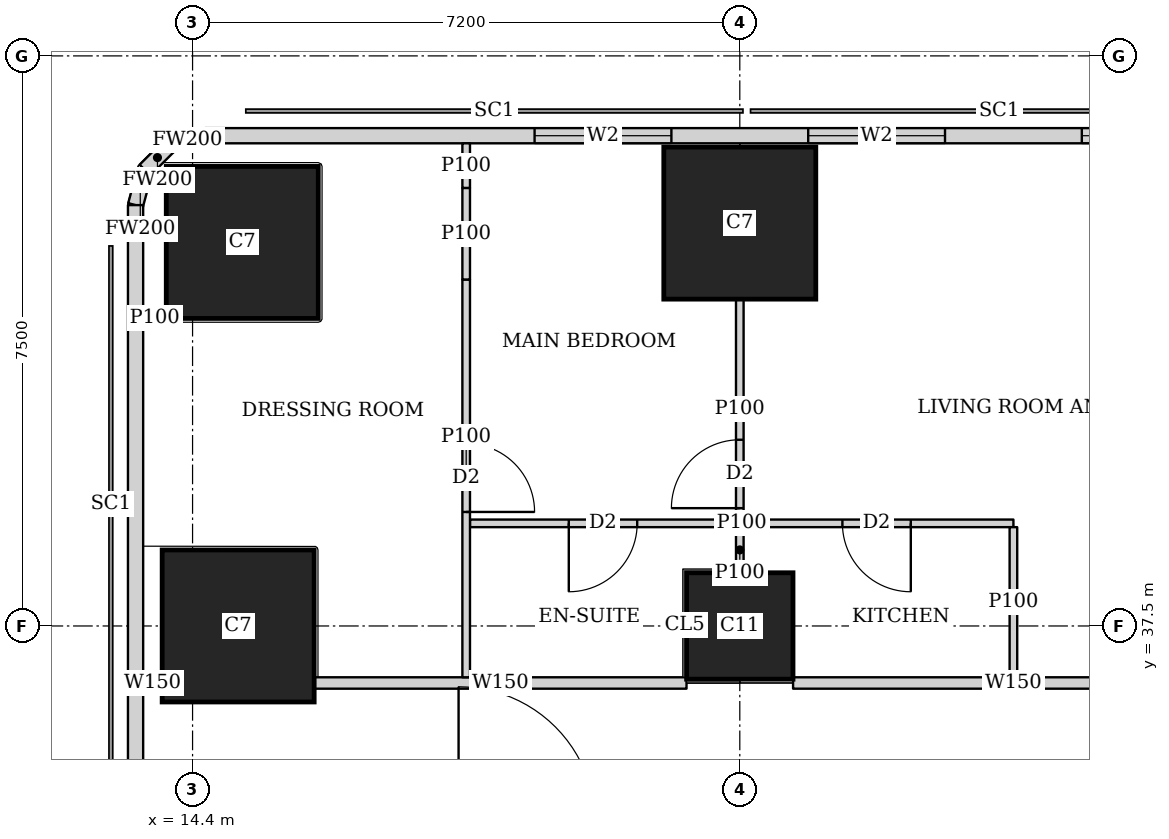
"""IFC4 building model, lengths in metres.
Left out: names, types, materials, properties, quantities, classifications, styles, units other than length and angle.
Written with IfcOpenShell. Run it as: python <this file> out.ifc"""

import sys

from ifc_helpers import new_model, si_unit, direction, frame, frame_2d, origin, origin_2d, place, context, subcontext, project, spatial, rectangle, extrude, element, fill, save


model = new_model("IFC4")
c1 = context("Model", 3, precision=1e-05, world=origin(), true_north=direction((0.0, 1.0)))
c2 = subcontext(c1, "Body", "Model", "MODEL_VIEW")
j1 = project(units=[si_unit("LENGTHUNIT", "METRE"), si_unit("PLANEANGLEUNIT", "RADIAN")], contexts=[c1])
p1 = place(None, origin())
s1 = spatial("IfcSite", under=j1, at=p1, CompositionType="ELEMENT")
p2 = place(p1, origin())
s2 = spatial("IfcBuilding", under=s1, at=p2, CompositionType="ELEMENT")
p3 = place(p2, frame((0.0, 0.0, 292.85)))
s3 = spatial("IfcBuildingStorey", under=s2, at=p3, CompositionType="ELEMENT", Elevation=292.85)
p4 = place(p3, frame((15.0, 37.5, 0.0), z_axis=(0.0, 0.0, 1.0), x_axis=(1.0, 0.0, 0.0)))
e1 = element("IfcColumn", 1, at=p4, inside=s3, PredefinedType="COLUMN", context=c2, shape_type="SweptSolid", body=[
    extrude(rectangle(XDim=2.0, YDim=2.0, at=origin_2d()), origin(), (0.0, 0.0, 1.0), 3.75),
])
p5 = place(p3, frame((21.6, 37.5, 0.0), z_axis=(0.0, 0.0, 1.0), x_axis=(1.0, 0.0, 0.0)))
e2 = element("IfcColumn", 2, at=p5, inside=s3, PredefinedType="COLUMN", context=c2, shape_type="SweptSolid", body=[
    extrude(rectangle(XDim=1.4, YDim=1.4, at=origin_2d()), origin(), (0.0, 0.0, 1.0), 3.75),
])
for number, where, z_axis, x_axis in (
    (3, (15.054, 42.546, 0.0), (0.0, 0.0, 1.0), (1.0, 0.0, 0.0)),
    (4, (21.6, 42.8, 0.0), (0.0, 0.0, 1.0), (1.0, 0.0, 0.0)),
):
    element("IfcColumn", number, at=place(p3, frame(where, z_axis=z_axis, x_axis=x_axis)), inside=s3, PredefinedType="COLUMN", context=c2, shape_type="SweptSolid", body=[
        extrude(rectangle(XDim=2.0, YDim=2.0, at=origin_2d()), origin(), (0.0, 0.0, 1.0), 3.75),
    ])
p6 = place(p3, frame((42.103, 43.95, 0.0), z_axis=(0.0, 0.0, 1.0), x_axis=(-1.0, 0.0, 0.0)))
e5 = element("IfcWall", 5, at=p6, inside=s3, PredefinedType="SOLIDWALL", context=c2, shape_type="SweptSolid", body=[
    extrude(rectangle(XDim=27.54, YDim=0.2, at=frame_2d((13.77, 0.0))), origin(), (0.0, 0.0, 1.0), 3.4),
])
p7 = place(p6, frame((10.603, 0.0, 0.9)))
e6 = element("IfcOpeningElement", 6, at=p7, cuts=e5, PredefinedType="OPENING", context=c2, shape_type="SweptSolid", body=[
    extrude(rectangle(XDim=1.8, YDim=1.5, at=frame_2d((0.9, 0.75))), frame((0.0, 0.11, 0.0), z_axis=(0.0, -1.0, 0.0), x_axis=(1.0, 0.0, 0.0)), (0.0, 0.0, 1.0), 0.22),
])
p8 = place(p6, frame((14.203, 0.0, 0.9)))
e7 = element("IfcOpeningElement", 7, at=p8, cuts=e5, PredefinedType="OPENING", context=c2, shape_type="SweptSolid", body=[
    extrude(rectangle(XDim=1.8, YDim=1.5, at=frame_2d((0.9, 0.75))), frame((0.0, 0.11, 0.0), z_axis=(0.0, -1.0, 0.0), x_axis=(1.0, 0.0, 0.0)), (0.0, 0.0, 1.0), 0.22),
])
p9 = place(p6, frame((17.803, 0.0, 0.9)))
e8 = element("IfcOpeningElement", 8, at=p9, cuts=e5, PredefinedType="OPENING", context=c2, shape_type="SweptSolid", body=[
    extrude(rectangle(XDim=1.8, YDim=1.5, at=frame_2d((0.9, 0.75))), frame((0.0, 0.11, 0.0), z_axis=(0.0, -1.0, 0.0), x_axis=(1.0, 0.0, 0.0)), (0.0, 0.0, 1.0), 0.22),
])
p10 = place(p6, frame((21.403, 0.0, 0.9)))
e9 = element("IfcOpeningElement", 9, at=p10, cuts=e5, PredefinedType="OPENING", context=c2, shape_type="SweptSolid", body=[
    extrude(rectangle(XDim=1.8, YDim=1.5, at=frame_2d((0.9, 0.75))), frame((0.0, 0.11, 0.0), z_axis=(0.0, -1.0, 0.0), x_axis=(1.0, 0.0, 0.0)), (0.0, 0.0, 1.0), 0.22),
])
p11 = place(p3, frame((14.563, 43.95, 0.0), z_axis=(0.0, 0.0, 1.0), x_axis=(-0.965655254015, -0.259826731483, 0.0)))
e10 = element("IfcWall", 10, at=p11, inside=s3, PredefinedType="SOLIDWALL", context=c2, shape_type="SweptSolid", body=[
    extrude(rectangle(XDim=0.477, YDim=0.2, at=frame_2d((0.239, 0.0))), origin(), (0.0, 0.0, 1.0), 3.4),
])
p12 = place(p3, frame((14.102, 43.826, 0.0), z_axis=(0.0, 0.0, 1.0), x_axis=(-0.707369890659, -0.706843573776, 0.0)))
e11 = element("IfcWall", 11, at=p12, inside=s3, PredefinedType="SOLIDWALL", context=c2, shape_type="SweptSolid", body=[
    extrude(rectangle(XDim=0.464, YDim=0.2, at=frame_2d((0.232, 0.0))), origin(), (0.0, 0.0, 1.0), 3.4),
])
p13 = place(p3, frame((13.774, 43.498, 0.0), z_axis=(0.0, 0.0, 1.0), x_axis=(-0.259826731483, -0.965655254015, 0.0)))
e12 = element("IfcWall", 12, at=p13, inside=s3, PredefinedType="SOLIDWALL", context=c2, shape_type="SweptSolid", body=[
    extrude(rectangle(XDim=0.477, YDim=0.2, at=frame_2d((0.239, 0.0))), origin(), (0.0, 0.0, 1.0), 3.4),
])
p14 = place(p3, frame((13.65, 43.037, 0.0), z_axis=(0.0, 0.0, 1.0), x_axis=(0.0, -1.0, 0.0)))
e13 = element("IfcWall", 13, at=p14, inside=s3, PredefinedType="SOLIDWALL", context=c2, shape_type="SweptSolid", body=[
    extrude(rectangle(XDim=35.374, YDim=0.2, at=frame_2d((17.687, 0.0))), origin(), (0.0, 0.0, 1.0), 3.4),
])
p15 = place(p3, frame((13.75, 36.75, 0.0), z_axis=(0.0, 0.0, 1.0), x_axis=(1.0, 0.0, 0.0)))
e14 = element("IfcWall", 14, at=p15, inside=s3, PredefinedType="SOLIDWALL", context=c2, shape_type="SweptSolid", body=[
    extrude(rectangle(XDim=0.249, YDim=0.15, at=frame_2d((0.125, 0.0))), origin(), (0.0, 0.0, 1.0), 3.4),
])
p16 = place(p3, frame((16.001, 36.75, 0.0), z_axis=(0.0, 0.0, 1.0), x_axis=(1.0, 0.0, 0.0)))
e15 = element("IfcWall", 15, at=p16, inside=s3, PredefinedType="SOLIDWALL", context=c2, shape_type="SweptSolid", body=[
    extrude(rectangle(XDim=4.898, YDim=0.15, at=frame_2d((2.449, 0.0))), origin(), (0.0, 0.0, 1.0), 3.4),
])
p17 = place(p3, frame((22.301, 36.75, 0.0), z_axis=(0.0, 0.0, 1.0), x_axis=(1.0, 0.0, 0.0)))
e16 = element("IfcWall", 16, at=p17, inside=s3, PredefinedType="SOLIDWALL", context=c2, shape_type="SweptSolid", body=[
    extrude(rectangle(XDim=5.798, YDim=0.15, at=frame_2d((2.899, 0.0))), origin(), (0.0, 0.0, 1.0), 3.4),
])
p18 = place(p17, frame((4.199, 0.0, 0.0)))
e17 = element("IfcOpeningElement", 17, at=p18, cuts=e16, PredefinedType="OPENING", context=c2, shape_type="SweptSolid", body=[
    extrude(rectangle(XDim=1.0, YDim=2.1, at=frame_2d((0.5, 1.05))), frame((0.0, 0.085, 0.0), z_axis=(0.0, -1.0, 0.0), x_axis=(1.0, 0.0, 0.0)), (0.0, 0.0, 1.0), 0.17),
])
p19 = place(p3, frame((14.054, 41.546, 0.0), z_axis=(0.0, 0.0, 1.0), x_axis=(-1.0, 0.0, 0.0)))
e18 = element("IfcWall", 18, at=p19, inside=s3, PredefinedType="PARTITIONING", context=c2, shape_type="SweptSolid", body=[
    extrude(rectangle(XDim=0.304, YDim=0.1, at=frame_2d((0.152, 0.0))), origin(), (0.0, 0.0, 1.0), 3.4),
])
p20 = place(p3, frame((18.0, 36.825, 0.0), z_axis=(0.0, 0.0, 1.0), x_axis=(0.0, 1.0, 0.0)))
e19 = element("IfcWall", 19, at=p20, inside=s3, PredefinedType="PARTITIONING", context=c2, shape_type="SweptSolid", body=[
    extrude(rectangle(XDim=5.233, YDim=0.1, at=frame_2d((2.617, 0.0))), origin(), (0.0, 0.0, 1.0), 3.4),
])
p21 = place(p20, frame((2.175, 0.0, 0.0)))
e20 = element("IfcOpeningElement", 20, at=p21, cuts=e19, PredefinedType="OPENING", context=c2, shape_type="SweptSolid", body=[
    extrude(rectangle(XDim=0.9, YDim=2.1, at=frame_2d((0.45, 1.05))), frame((0.0, 0.06, 0.0), z_axis=(0.0, -1.0, 0.0), x_axis=(1.0, 0.0, 0.0)), (0.0, 0.0, 1.0), 0.12),
])
p22 = place(p3, frame((18.0, 42.058, 0.0), z_axis=(0.0, 0.0, 1.0), x_axis=(0.0, 1.0, 0.0)))
e21 = element("IfcWall", 21, at=p22, inside=s3, PredefinedType="PARTITIONING", context=c2, shape_type="SweptSolid", body=[
    extrude(rectangle(XDim=1.205, YDim=0.1, at=frame_2d((0.603, 0.0))), origin(), (0.0, 0.0, 1.0), 1.95),
])
p23 = place(p3, frame((18.0, 43.263, 0.0), z_axis=(0.0, 0.0, 1.0), x_axis=(0.0, 1.0, 0.0)))
e22 = element("IfcWall", 22, at=p23, inside=s3, PredefinedType="PARTITIONING", context=c2, shape_type="SweptSolid", body=[
    extrude(rectangle(XDim=0.587, YDim=0.1, at=frame_2d((0.293, 0.0))), origin(), (0.0, 0.0, 1.0), 3.4),
])
p24 = place(p3, frame((21.6, 38.9, 0.0), z_axis=(0.0, 0.0, 1.0), x_axis=(0.0, 1.0, 0.0)))
e23 = element("IfcWall", 23, at=p24, inside=s3, PredefinedType="PARTITIONING", context=c2, shape_type="SweptSolid", body=[
    extrude(rectangle(XDim=2.899, YDim=0.1, at=frame_2d((1.45, 0.0))), origin(), (0.0, 0.0, 1.0), 3.4),
])
p25 = place(p24, frame((0.15, 0.0, 0.0)))
e24 = element("IfcOpeningElement", 24, at=p25, cuts=e23, PredefinedType="OPENING", context=c2, shape_type="SweptSolid", body=[
    extrude(rectangle(XDim=0.9, YDim=2.1, at=frame_2d((0.45, 1.05))), frame((0.0, 0.06, 0.0), z_axis=(0.0, -1.0, 0.0), x_axis=(1.0, 0.0, 0.0)), (0.0, 0.0, 1.0), 0.12),
])
p26 = place(p3, frame((21.6, 38.201, 0.0), z_axis=(0.0, 0.0, 1.0), x_axis=(0.0, 1.0, 0.0)))
e25 = element("IfcWall", 25, at=p26, inside=s3, PredefinedType="PARTITIONING", context=c2, shape_type="SweptSolid", body=[
    extrude(rectangle(XDim=0.599, YDim=0.1, at=frame_2d((0.3, 0.0))), origin(), (0.0, 0.0, 1.0), 3.4),
])
p27 = place(p3, frame((25.2, 36.825, 0.0), z_axis=(0.0, 0.0, 1.0), x_axis=(0.0, 1.0, 0.0)))
e26 = element("IfcWall", 26, at=p27, inside=s3, PredefinedType="PARTITIONING", context=c2, shape_type="SweptSolid", body=[
    extrude(rectangle(XDim=1.975, YDim=0.1, at=frame_2d((0.988, 0.0))), origin(), (0.0, 0.0, 1.0), 3.4),
])
p28 = place(p3, frame((18.05, 38.85, 0.0), z_axis=(0.0, 0.0, 1.0), x_axis=(1.0, 0.0, 0.0)))
e27 = element("IfcWall", 27, at=p28, inside=s3, PredefinedType="PARTITIONING", context=c2, shape_type="SweptSolid", body=[
    extrude(rectangle(XDim=7.15, YDim=0.1, at=frame_2d((3.575, 0.0))), origin(), (0.0, 0.0, 1.0), 3.4),
])
p29 = place(p28, frame((1.3, 0.0, 0.0)))
e28 = element("IfcOpeningElement", 28, at=p29, cuts=e27, PredefinedType="OPENING", context=c2, shape_type="SweptSolid", body=[
    extrude(rectangle(XDim=0.9, YDim=2.1, at=frame_2d((0.45, 1.05))), frame((0.0, 0.06, 0.0), z_axis=(0.0, -1.0, 0.0), x_axis=(1.0, 0.0, 0.0)), (0.0, 0.0, 1.0), 0.12),
])
p30 = place(p28, frame((4.9, 0.0, 0.0)))
e29 = element("IfcOpeningElement", 29, at=p30, cuts=e27, PredefinedType="OPENING", context=c2, shape_type="SweptSolid", body=[
    extrude(rectangle(XDim=0.9, YDim=2.1, at=frame_2d((0.45, 1.05))), frame((0.0, 0.06, 0.0), z_axis=(0.0, -1.0, 0.0), x_axis=(1.0, 0.0, 0.0)), (0.0, 0.0, 1.0), 0.12),
])
p31 = place(p8, origin())
e30 = element("IfcWindow", 30, at=p31, inside=s3, PartitioningType="SINGLE_PANEL", PredefinedType="WINDOW", context=c2, shape_type="SweptSolid", body=[
    extrude(rectangle(XDim=1.8, YDim=1.5, at=frame_2d((0.9, 0.75))), frame((0.0, 0.03, 0.0), z_axis=(0.0, -1.0, 0.0), x_axis=(1.0, 0.0, 0.0)), (0.0, 0.0, 1.0), 0.06),
])
fill(e7, e30)
p32 = place(p9, origin())
e31 = element("IfcWindow", 31, at=p32, inside=s3, PartitioningType="SINGLE_PANEL", PredefinedType="WINDOW", context=c2, shape_type="SweptSolid", body=[
    extrude(rectangle(XDim=1.8, YDim=1.5, at=frame_2d((0.9, 0.75))), frame((0.0, 0.03, 0.0), z_axis=(0.0, -1.0, 0.0), x_axis=(1.0, 0.0, 0.0)), (0.0, 0.0, 1.0), 0.06),
])
fill(e8, e31)
p33 = place(p10, origin())
e32 = element("IfcWindow", 32, at=p33, inside=s3, PartitioningType="SINGLE_PANEL", PredefinedType="WINDOW", context=c2, shape_type="SweptSolid", body=[
    extrude(rectangle(XDim=1.8, YDim=1.5, at=frame_2d((0.9, 0.75))), frame((0.0, 0.03, 0.0), z_axis=(0.0, -1.0, 0.0), x_axis=(1.0, 0.0, 0.0)), (0.0, 0.0, 1.0), 0.06),
])
fill(e9, e32)
p34 = place(p25, origin())
e33 = element("IfcDoor", 33, at=p34, inside=s3, OperationType="SINGLE_SWING_LEFT", PredefinedType="DOOR", context=c2, shape_type="SweptSolid", body=[
    extrude(rectangle(XDim=0.9, YDim=2.1, at=frame_2d((0.45, 1.05))), frame((0.0, 0.025, 0.0), z_axis=(0.0, -1.0, 0.0), x_axis=(1.0, 0.0, 0.0)), (0.0, 0.0, 1.0), 0.05),
])
fill(e24, e33)
p35 = place(p21, origin())
e34 = element("IfcDoor", 34, at=p35, inside=s3, OperationType="SINGLE_SWING_RIGHT", PredefinedType="DOOR", context=c2, shape_type="SweptSolid", body=[
    extrude(rectangle(XDim=0.9, YDim=2.1, at=frame_2d((0.45, 1.05))), frame((0.0, 0.025, 0.0), z_axis=(0.0, -1.0, 0.0), x_axis=(1.0, 0.0, 0.0)), (0.0, 0.0, 1.0), 0.05),
])
fill(e20, e34)
p36 = place(p29, origin())
e35 = element("IfcDoor", 35, at=p36, inside=s3, OperationType="SINGLE_SWING_RIGHT", PredefinedType="DOOR", context=c2, shape_type="SweptSolid", body=[
    extrude(rectangle(XDim=0.9, YDim=2.1, at=frame_2d((0.45, 1.05))), frame((0.0, 0.025, 0.0), z_axis=(0.0, -1.0, 0.0), x_axis=(1.0, 0.0, 0.0)), (0.0, 0.0, 1.0), 0.05),
])
fill(e28, e35)
p37 = place(p30, origin())
e36 = element("IfcDoor", 36, at=p37, inside=s3, OperationType="SINGLE_SWING_LEFT", PredefinedType="DOOR", context=c2, shape_type="SweptSolid", body=[
    extrude(rectangle(XDim=0.9, YDim=2.1, at=frame_2d((0.45, 1.05))), frame((0.0, 0.025, 0.0), z_axis=(0.0, -1.0, 0.0), x_axis=(1.0, 0.0, 0.0)), (0.0, 0.0, 1.0), 0.05),
])
fill(e29, e36)
save(model, sys.argv[1])
